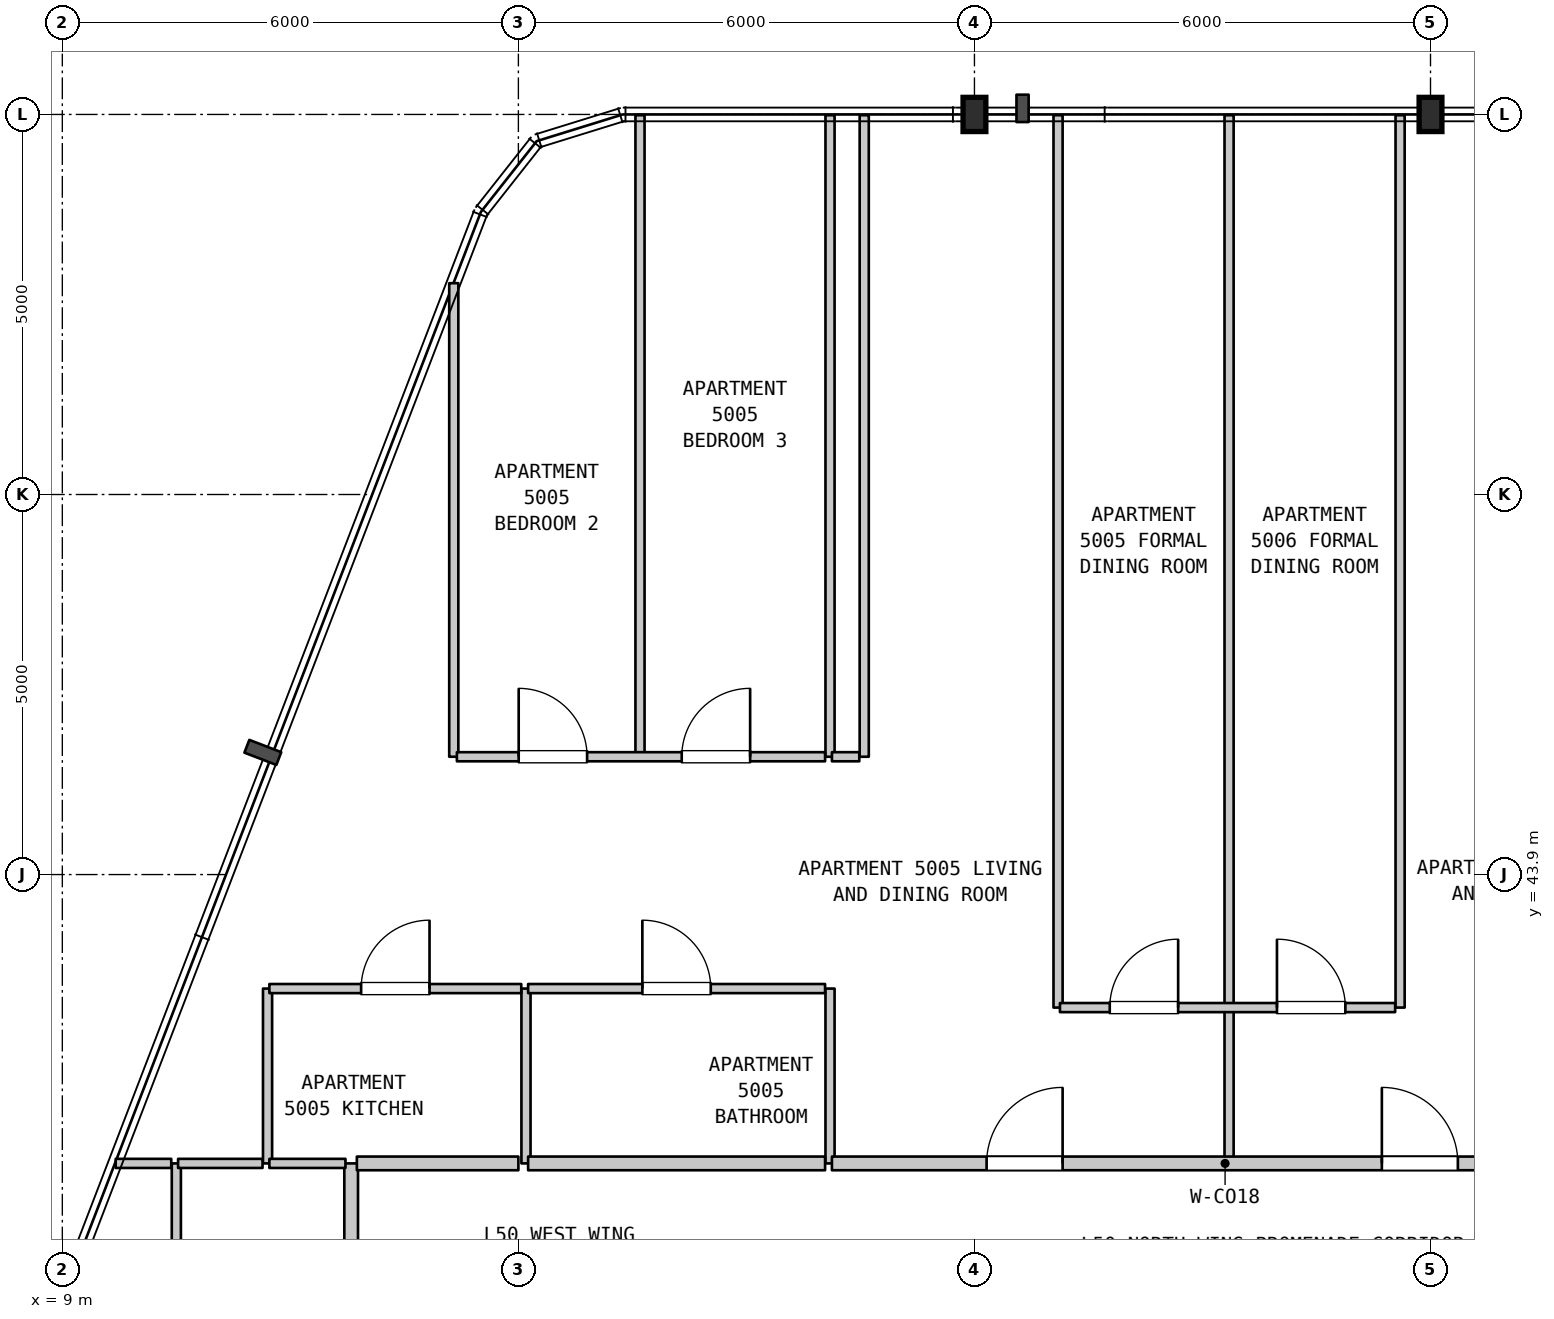
"""IFC4 building model, lengths in metres.
Left out: names, types, materials, properties, quantities, classifications, styles, units other than length and angle.
Written with IfcOpenShell. Run it as: python <this file> out.ifc"""

import sys

from ifc_helpers import new_model, si_unit, direction, frame, frame_2d, origin, origin_2d, place, context, subcontext, project, spatial, rectangle, i_section, extrude, element, fill, save


model = new_model("IFC4")
c1 = context("Model", 3, precision=1e-05, world=origin(), true_north=direction((0.0, 1.0)))
c2 = subcontext(c1, "Body", "Model", "MODEL_VIEW")
j1 = project(units=[si_unit("LENGTHUNIT", "METRE"), si_unit("PLANEANGLEUNIT", "RADIAN")], contexts=[c1])
p1 = place(None, origin())
s1 = spatial("IfcSite", under=j1, at=p1, CompositionType="ELEMENT")
p2 = place(p1, origin())
s2 = spatial("IfcBuilding", under=s1, at=p2, CompositionType="ELEMENT")
p3 = place(p2, frame((0.0, 0.0, 203.2)))
s3 = spatial("IfcBuildingStorey", under=s2, at=p3, CompositionType="ELEMENT", Elevation=203.2)
for number, where, z_axis, x_axis in (
    (1, (21.0, 53.9, 0.0), (0.0, 0.0, 1.0), (1.0, 0.0, 0.0)),
    (2, (27.0, 53.9, 0.0), (0.0, 0.0, 1.0), (1.0, 0.0, 0.0)),
):
    element("IfcColumn", number, at=place(p3, frame(where, z_axis=z_axis, x_axis=x_axis)), inside=s3, PredefinedType="COLUMN", context=c2, shape_type="SweptSolid", body=[
        extrude(i_section(OverallWidth=0.3, OverallDepth=0.45, WebThickness=0.014, FlangeThickness=0.026, FilletRadius=0.027, at=origin_2d()), origin(), (0.0, 0.0, 1.0), 3.7),
    ])
p4 = place(p3, frame((10.5, 32.36, 0.0), z_axis=(0.0, 0.0, 1.0), x_axis=(0.0, 1.0, 0.0)))
e3 = element("IfcWall", 3, at=p4, inside=s3, PredefinedType="PARTITIONING", context=c2, shape_type="SweptSolid", body=[
    extrude(rectangle(XDim=7.74, YDim=0.12, at=frame_2d((3.87, 0.0))), origin(), (0.0, 0.0, 1.0), 3.39),
])
p5 = place(p3, frame((11.7, 40.1, 0.0), z_axis=(0.0, 0.0, 1.0), x_axis=(0.0, 1.0, 0.0)))
e4 = element("IfcWall", 4, at=p5, inside=s3, PredefinedType="PARTITIONING", context=c2, shape_type="SweptSolid", body=[
    extrude(rectangle(XDim=2.3, YDim=0.12, at=frame_2d((1.15, 0.0))), origin(), (0.0, 0.0, 1.0), 3.39),
])
p6 = place(p3, frame((12.8, 32.36, 0.0), z_axis=(0.0, 0.0, 1.0), x_axis=(0.0, 1.0, 0.0)))
e5 = element("IfcWall", 5, at=p6, inside=s3, PredefinedType="STANDARD", context=c2, shape_type="SweptSolid", body=[
    extrude(rectangle(XDim=7.74, YDim=0.18, at=frame_2d((3.87, 0.0))), origin(), (0.0, 0.0, 1.0), 3.39),
])
p7 = place(p3, frame((14.15, 45.45, 0.0), z_axis=(0.0, 0.0, 1.0), x_axis=(0.0, 1.0, 0.0)))
e6 = element("IfcWall", 6, at=p7, inside=s3, PredefinedType="PARTITIONING", context=c2, shape_type="SweptSolid", body=[
    extrude(rectangle(XDim=6.23, YDim=0.12, at=frame_2d((3.115, 0.0))), origin(), (0.0, 0.0, 1.0), 3.39),
])
p8 = place(p3, frame((15.1, 40.1, 0.0), z_axis=(0.0, 0.0, 1.0), x_axis=(0.0, 1.0, 0.0)))
e7 = element("IfcWall", 7, at=p8, inside=s3, PredefinedType="PARTITIONING", context=c2, shape_type="SweptSolid", body=[
    extrude(rectangle(XDim=2.3, YDim=0.12, at=frame_2d((1.15, 0.0))), origin(), (0.0, 0.0, 1.0), 3.39),
])
p9 = place(p3, frame((16.6, 45.45, 0.0), z_axis=(0.0, 0.0, 1.0), x_axis=(0.0, 1.0, 0.0)))
e8 = element("IfcWall", 8, at=p9, inside=s3, PredefinedType="PARTITIONING", context=c2, shape_type="SweptSolid", body=[
    extrude(rectangle(XDim=8.44, YDim=0.12, at=frame_2d((4.22, 0.0))), origin(), (0.0, 0.0, 1.0), 3.39),
])
p10 = place(p3, frame((19.1, 40.1, 0.0), z_axis=(0.0, 0.0, 1.0), x_axis=(0.0, 1.0, 0.0)))
e9 = element("IfcWall", 9, at=p10, inside=s3, PredefinedType="PARTITIONING", context=c2, shape_type="SweptSolid", body=[
    extrude(rectangle(XDim=2.3, YDim=0.12, at=frame_2d((1.15, 0.0))), origin(), (0.0, 0.0, 1.0), 3.39),
])
for number, where, z_axis, x_axis in (
    (10, (19.1, 45.45, 0.0), (0.0, 0.0, 1.0), (0.0, 1.0, 0.0)),
    (11, (19.55, 45.45, 0.0), (0.0, 0.0, 1.0), (0.0, 1.0, 0.0)),
):
    element("IfcWall", number, at=place(p3, frame(where, z_axis=z_axis, x_axis=x_axis)), inside=s3, PredefinedType="PARTITIONING", context=c2, shape_type="SweptSolid", body=[
        extrude(rectangle(XDim=8.44, YDim=0.12, at=frame_2d((4.22, 0.0))), origin(), (0.0, 0.0, 1.0), 3.39),
    ])
p11 = place(p3, frame((22.1, 42.15, 0.0), z_axis=(0.0, 0.0, 1.0), x_axis=(0.0, 1.0, 0.0)))
e12 = element("IfcWall", 12, at=p11, inside=s3, PredefinedType="PARTITIONING", context=c2, shape_type="SweptSolid", body=[
    extrude(rectangle(XDim=11.74, YDim=0.12, at=frame_2d((5.87, 0.0))), origin(), (0.0, 0.0, 1.0), 3.39),
])
p12 = place(p3, frame((24.35, 40.1, 0.0), z_axis=(0.0, 0.0, 1.0), x_axis=(0.0, 1.0, 0.0)))
e13 = element("IfcWall", 13, at=p12, inside=s3, PredefinedType="PARTITIONING", context=c2, shape_type="SweptSolid", body=[
    extrude(rectangle(XDim=2.05, YDim=0.12, at=frame_2d((1.025, 0.0))), origin(), (0.0, 0.0, 1.0), 3.39),
])
for number, where, z_axis, x_axis in (
    (14, (24.35, 42.15, 0.0), (0.0, 0.0, 1.0), (0.0, 1.0, 0.0)),
    (15, (26.6, 42.15, 0.0), (0.0, 0.0, 1.0), (0.0, 1.0, 0.0)),
):
    element("IfcWall", number, at=place(p3, frame(where, z_axis=z_axis, x_axis=x_axis)), inside=s3, PredefinedType="PARTITIONING", context=c2, shape_type="SweptSolid", body=[
        extrude(rectangle(XDim=11.74, YDim=0.12, at=frame_2d((5.87, 0.0))), origin(), (0.0, 0.0, 1.0), 3.39),
    ])
p13 = place(p3, frame((9.702, 40.1, 0.0), z_axis=(0.0, 0.0, 1.0), x_axis=(1.0, 0.0, 0.0)))
e16 = element("IfcWall", 16, at=p13, inside=s3, PredefinedType="PARTITIONING", context=c2, shape_type="SweptSolid", body=[
    extrude(rectangle(XDim=0.731, YDim=0.12, at=frame_2d((0.366, 0.0))), origin(), (0.0, 0.0, 1.0), 3.39),
])
p14 = place(p3, frame((10.523, 40.1, 0.0), z_axis=(0.0, 0.0, 1.0), x_axis=(1.0, 0.0, 0.0)))
e17 = element("IfcWall", 17, at=p14, inside=s3, PredefinedType="PARTITIONING", context=c2, shape_type="SweptSolid", body=[
    extrude(rectangle(XDim=1.111, YDim=0.12, at=frame_2d((0.556, 0.0))), origin(), (0.0, 0.0, 1.0), 3.39),
])
p15 = place(p3, frame((11.724, 40.1, 0.0), z_axis=(0.0, 0.0, 1.0), x_axis=(1.0, 0.0, 0.0)))
e18 = element("IfcWall", 18, at=p15, inside=s3, PredefinedType="PARTITIONING", context=c2, shape_type="SweptSolid", body=[
    extrude(rectangle(XDim=1.001, YDim=0.12, at=frame_2d((0.5, 0.0))), origin(), (0.0, 0.0, 1.0), 3.39),
])
p16 = place(p3, frame((12.875, 40.1, 0.0), z_axis=(0.0, 0.0, 1.0), x_axis=(1.0, 0.0, 0.0)))
e19 = element("IfcWall", 19, at=p16, inside=s3, PredefinedType="STANDARD", context=c2, shape_type="SweptSolid", body=[
    extrude(rectangle(XDim=2.125, YDim=0.18, at=frame_2d((1.062, 0.0))), origin(), (0.0, 0.0, 1.0), 3.39),
])
p17 = place(p3, frame((15.128, 40.1, 0.0), z_axis=(0.0, 0.0, 1.0), x_axis=(1.0, 0.0, 0.0)))
e20 = element("IfcWall", 20, at=p17, inside=s3, PredefinedType="STANDARD", context=c2, shape_type="SweptSolid", body=[
    extrude(rectangle(XDim=3.907, YDim=0.18, at=frame_2d((1.954, 0.0))), origin(), (0.0, 0.0, 1.0), 3.39),
])
p18 = place(p3, frame((19.125, 40.1, 0.0), z_axis=(0.0, 0.0, 1.0), x_axis=(1.0, 0.0, 0.0)))
e21 = element("IfcWall", 21, at=p18, inside=s3, PredefinedType="STANDARD", context=c2, shape_type="SweptSolid", body=[
    extrude(rectangle(XDim=10.345, YDim=0.18, at=frame_2d((5.172, 0.0))), origin(), (0.0, 0.0, 1.0), 3.39),
])
p19 = place(p18, frame((2.035, 0.0, 0.0)))
e22 = element("IfcOpeningElement", 22, at=p19, cuts=e21, PredefinedType="OPENING", context=c2, shape_type="SweptSolid", body=[
    extrude(rectangle(XDim=1.0, YDim=2.15, at=frame_2d((0.5, 1.075))), frame((0.0, 0.1, 0.0), z_axis=(0.0, -1.0, 0.0), x_axis=(1.0, 0.0, 0.0)), (0.0, 0.0, 1.0), 0.2),
])
p20 = place(p18, frame((7.235, 0.0, 0.0)))
e23 = element("IfcOpeningElement", 23, at=p20, cuts=e21, PredefinedType="OPENING", context=c2, shape_type="SweptSolid", body=[
    extrude(rectangle(XDim=1.0, YDim=2.15, at=frame_2d((0.5, 1.075))), frame((0.0, 0.1, 0.0), z_axis=(0.0, -1.0, 0.0), x_axis=(1.0, 0.0, 0.0)), (0.0, 0.0, 1.0), 0.2),
])
p21 = place(p3, frame((22.125, 42.15, 0.0), z_axis=(0.0, 0.0, 1.0), x_axis=(1.0, 0.0, 0.0)))
e24 = element("IfcWall", 24, at=p21, inside=s3, PredefinedType="PARTITIONING", context=c2, shape_type="SweptSolid", body=[
    extrude(rectangle(XDim=4.41, YDim=0.12, at=frame_2d((2.205, 0.0))), origin(), (0.0, 0.0, 1.0), 3.39),
])
p22 = place(p21, frame((0.655, 0.0, 0.0)))
e25 = element("IfcOpeningElement", 25, at=p22, cuts=e24, PredefinedType="OPENING", context=c2, shape_type="SweptSolid", body=[
    extrude(rectangle(XDim=0.9, YDim=2.15, at=frame_2d((0.45, 1.075))), frame((0.0, 0.07, 0.0), z_axis=(0.0, -1.0, 0.0), x_axis=(1.0, 0.0, 0.0)), (0.0, 0.0, 1.0), 0.14),
])
p23 = place(p21, frame((2.855, 0.0, 0.0)))
e26 = element("IfcOpeningElement", 26, at=p23, cuts=e24, PredefinedType="OPENING", context=c2, shape_type="SweptSolid", body=[
    extrude(rectangle(XDim=0.9, YDim=2.15, at=frame_2d((0.45, 1.075))), frame((0.0, 0.07, 0.0), z_axis=(0.0, -1.0, 0.0), x_axis=(1.0, 0.0, 0.0)), (0.0, 0.0, 1.0), 0.14),
])
p24 = place(p3, frame((11.724, 42.4, 0.0), z_axis=(0.0, 0.0, 1.0), x_axis=(1.0, 0.0, 0.0)))
e27 = element("IfcWall", 27, at=p24, inside=s3, PredefinedType="PARTITIONING", context=c2, shape_type="SweptSolid", body=[
    extrude(rectangle(XDim=3.314, YDim=0.12, at=frame_2d((1.657, 0.0))), origin(), (0.0, 0.0, 1.0), 3.39),
])
p25 = place(p24, frame((1.207, 0.0, 0.0)))
e28 = element("IfcOpeningElement", 28, at=p25, cuts=e27, PredefinedType="OPENING", context=c2, shape_type="SweptSolid", body=[
    extrude(rectangle(XDim=0.9, YDim=2.15, at=frame_2d((0.45, 1.075))), frame((0.0, 0.07, 0.0), z_axis=(0.0, -1.0, 0.0), x_axis=(1.0, 0.0, 0.0)), (0.0, 0.0, 1.0), 0.14),
])
p26 = place(p3, frame((15.128, 42.4, 0.0), z_axis=(0.0, 0.0, 1.0), x_axis=(1.0, 0.0, 0.0)))
e29 = element("IfcWall", 29, at=p26, inside=s3, PredefinedType="PARTITIONING", context=c2, shape_type="SweptSolid", body=[
    extrude(rectangle(XDim=3.907, YDim=0.12, at=frame_2d((1.954, 0.0))), origin(), (0.0, 0.0, 1.0), 3.39),
])
p27 = place(p26, frame((1.503, 0.0, 0.0)))
e30 = element("IfcOpeningElement", 30, at=p27, cuts=e29, PredefinedType="OPENING", context=c2, shape_type="SweptSolid", body=[
    extrude(rectangle(XDim=0.9, YDim=2.1, at=frame_2d((0.45, 1.05))), frame((0.0, 0.07, 0.0), z_axis=(0.0, -1.0, 0.0), x_axis=(1.0, 0.0, 0.0)), (0.0, 0.0, 1.0), 0.14),
])
p28 = place(p3, frame((14.191, 45.45, 0.0), z_axis=(0.0, 0.0, 1.0), x_axis=(1.0, 0.0, 0.0)))
e31 = element("IfcWall", 31, at=p28, inside=s3, PredefinedType="PARTITIONING", context=c2, shape_type="SweptSolid", body=[
    extrude(rectangle(XDim=4.844, YDim=0.12, at=frame_2d((2.422, 0.0))), origin(), (0.0, 0.0, 1.0), 3.39),
])
p29 = place(p28, frame((0.813, 0.0, 0.0)))
e32 = element("IfcOpeningElement", 32, at=p29, cuts=e31, PredefinedType="OPENING", context=c2, shape_type="SweptSolid", body=[
    extrude(rectangle(XDim=0.9, YDim=2.15, at=frame_2d((0.45, 1.075))), frame((0.0, 0.07, 0.0), z_axis=(0.0, -1.0, 0.0), x_axis=(1.0, 0.0, 0.0)), (0.0, 0.0, 1.0), 0.14),
])
p30 = place(p28, frame((2.958, 0.0, 0.0)))
e33 = element("IfcOpeningElement", 33, at=p30, cuts=e31, PredefinedType="OPENING", context=c2, shape_type="SweptSolid", body=[
    extrude(rectangle(XDim=0.9, YDim=2.15, at=frame_2d((0.45, 1.075))), frame((0.0, 0.07, 0.0), z_axis=(0.0, -1.0, 0.0), x_axis=(1.0, 0.0, 0.0)), (0.0, 0.0, 1.0), 0.14),
])
p31 = place(p3, frame((19.125, 45.45, 0.0), z_axis=(0.0, 0.0, 1.0), x_axis=(1.0, 0.0, 0.0)))
e34 = element("IfcWall", 34, at=p31, inside=s3, PredefinedType="PARTITIONING", context=c2, shape_type="SweptSolid", body=[
    extrude(rectangle(XDim=0.36, YDim=0.12, at=frame_2d((0.18, 0.0))), origin(), (0.0, 0.0, 1.0), 3.39),
])
p32 = place(p19, origin())
e35 = element("IfcDoor", 35, at=p32, inside=s3, OperationType="SINGLE_SWING_RIGHT", PredefinedType="DOOR", context=c2, shape_type="SweptSolid", body=[
    extrude(rectangle(XDim=1.0, YDim=2.15, at=frame_2d((0.5, 1.075))), frame((0.0, 0.025, 0.0), z_axis=(0.0, -1.0, 0.0), x_axis=(1.0, 0.0, 0.0)), (0.0, 0.0, 1.0), 0.05),
])
fill(e22, e35)
p33 = place(p20, origin())
e36 = element("IfcDoor", 36, at=p33, inside=s3, OperationType="SINGLE_SWING_LEFT", PredefinedType="DOOR", context=c2, shape_type="SweptSolid", body=[
    extrude(rectangle(XDim=1.0, YDim=2.15, at=frame_2d((0.5, 1.075))), frame((0.0, 0.025, 0.0), z_axis=(0.0, -1.0, 0.0), x_axis=(1.0, 0.0, 0.0)), (0.0, 0.0, 1.0), 0.05),
])
fill(e23, e36)
p34 = place(p22, origin())
e37 = element("IfcDoor", 37, at=p34, inside=s3, OperationType="SINGLE_SWING_RIGHT", PredefinedType="DOOR", context=c2, shape_type="SweptSolid", body=[
    extrude(rectangle(XDim=0.9, YDim=2.15, at=frame_2d((0.45, 1.075))), frame((0.0, 0.025, 0.0), z_axis=(0.0, -1.0, 0.0), x_axis=(1.0, 0.0, 0.0)), (0.0, 0.0, 1.0), 0.05),
])
fill(e25, e37)
p35 = place(p23, origin())
e38 = element("IfcDoor", 38, at=p35, inside=s3, OperationType="SINGLE_SWING_LEFT", PredefinedType="DOOR", context=c2, shape_type="SweptSolid", body=[
    extrude(rectangle(XDim=0.9, YDim=2.15, at=frame_2d((0.45, 1.075))), frame((0.0, 0.025, 0.0), z_axis=(0.0, -1.0, 0.0), x_axis=(1.0, 0.0, 0.0)), (0.0, 0.0, 1.0), 0.05),
])
fill(e26, e38)
p36 = place(p25, origin())
e39 = element("IfcDoor", 39, at=p36, inside=s3, OperationType="SINGLE_SWING_RIGHT", PredefinedType="DOOR", context=c2, shape_type="SweptSolid", body=[
    extrude(rectangle(XDim=0.9, YDim=2.15, at=frame_2d((0.45, 1.075))), frame((0.0, 0.025, 0.0), z_axis=(0.0, -1.0, 0.0), x_axis=(1.0, 0.0, 0.0)), (0.0, 0.0, 1.0), 0.05),
])
fill(e28, e39)
p37 = place(p27, origin())
e40 = element("IfcDoor", 40, at=p37, inside=s3, OperationType="SINGLE_SWING_LEFT", PredefinedType="DOOR", context=c2, shape_type="SweptSolid", body=[
    extrude(rectangle(XDim=0.9, YDim=2.1, at=frame_2d((0.45, 1.05))), frame((0.0, 0.025, 0.0), z_axis=(0.0, -1.0, 0.0), x_axis=(1.0, 0.0, 0.0)), (0.0, 0.0, 1.0), 0.05),
])
fill(e30, e40)
p38 = place(p29, origin())
e41 = element("IfcDoor", 41, at=p38, inside=s3, OperationType="SINGLE_SWING_LEFT", PredefinedType="DOOR", context=c2, shape_type="SweptSolid", body=[
    extrude(rectangle(XDim=0.9, YDim=2.15, at=frame_2d((0.45, 1.075))), frame((0.0, 0.025, 0.0), z_axis=(0.0, -1.0, 0.0), x_axis=(1.0, 0.0, 0.0)), (0.0, 0.0, 1.0), 0.05),
])
fill(e32, e41)
p39 = place(p30, origin())
e42 = element("IfcDoor", 42, at=p39, inside=s3, OperationType="SINGLE_SWING_RIGHT", PredefinedType="DOOR", context=c2, shape_type="SweptSolid", body=[
    extrude(rectangle(XDim=0.9, YDim=2.15, at=frame_2d((0.45, 1.075))), frame((0.0, 0.025, 0.0), z_axis=(0.0, -1.0, 0.0), x_axis=(1.0, 0.0, 0.0)), (0.0, 0.0, 1.0), 0.05),
])
fill(e33, e42)
save(model, sys.argv[1])
